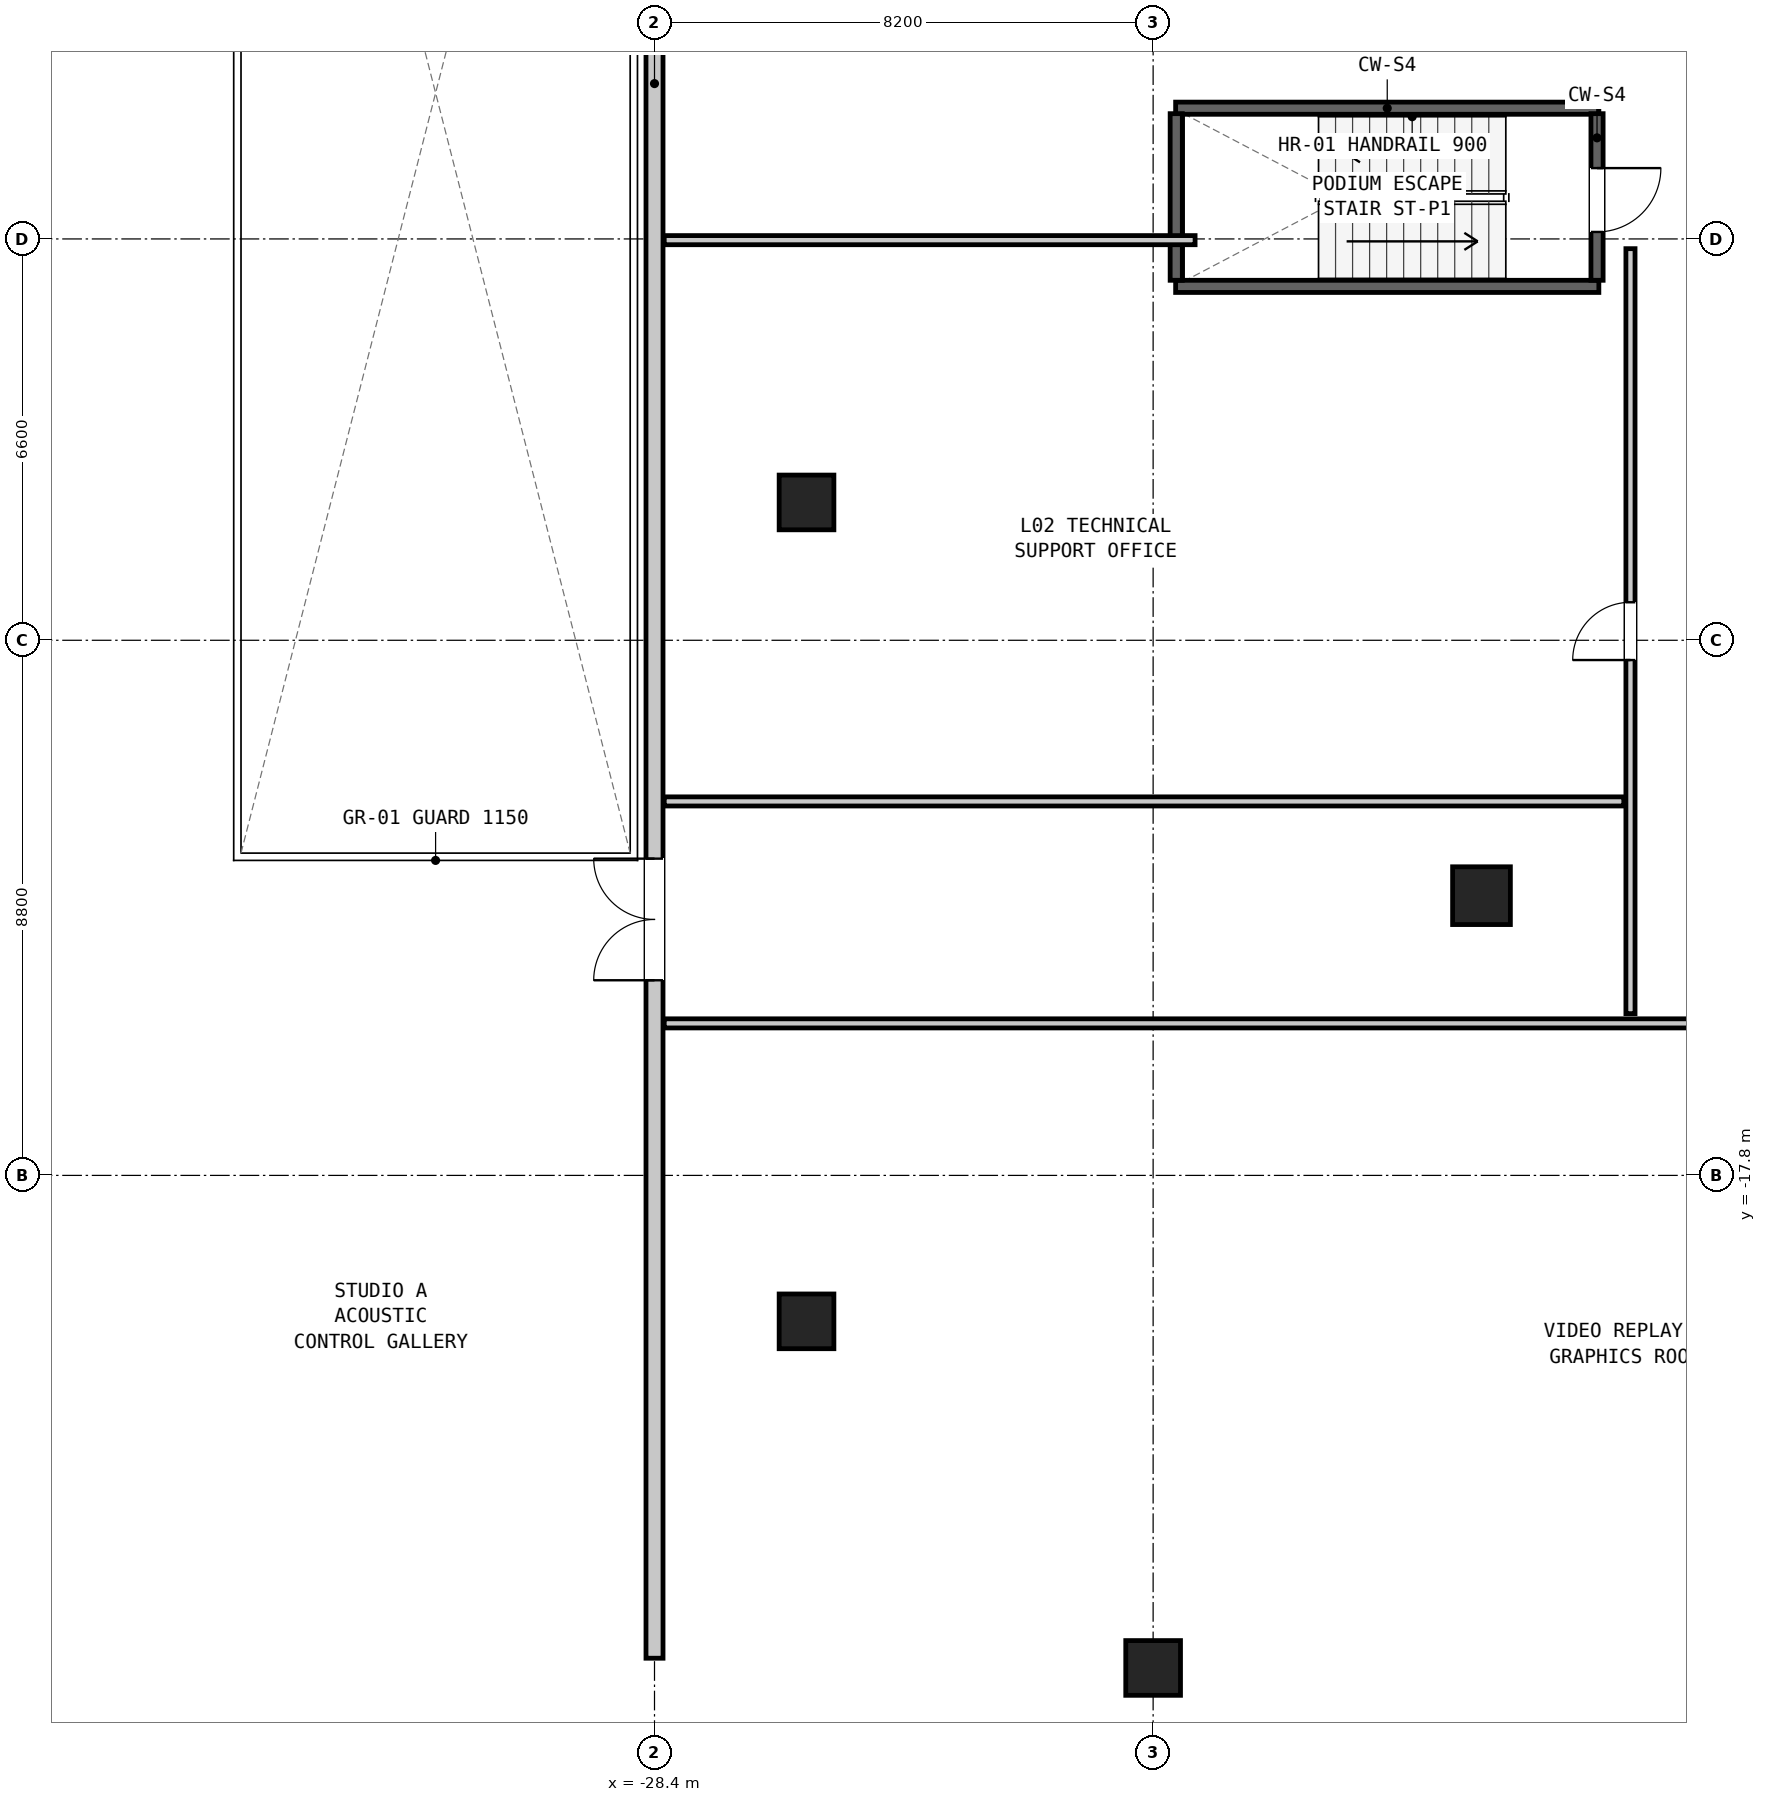
"""IFC4 building model, lengths in metres.
Left out: names, types, materials, properties, quantities, classifications, styles, units other than length and angle.
Written with IfcOpenShell. Run it as: python <this file> out.ifc"""

import sys

from ifc_helpers import new_model, si_unit, direction, frame, frame_2d, origin, origin_2d, place, context, subcontext, project, spatial, rectangle, hollow_rectangle, extrude, element, fill, save


model = new_model("IFC4")
c1 = context("Model", 3, precision=1e-05, world=origin(), true_north=direction((0.0, 1.0)))
c2 = subcontext(c1, "Body", "Model", "MODEL_VIEW")
j1 = project(units=[si_unit("LENGTHUNIT", "METRE"), si_unit("PLANEANGLEUNIT", "RADIAN")], contexts=[c1])
p1 = place(None, origin())
s1 = spatial("IfcSite", under=j1, at=p1, CompositionType="ELEMENT")
p2 = place(p1, origin())
s2 = spatial("IfcBuilding", under=s1, at=p2, CompositionType="ELEMENT")
p3 = place(p2, frame((0.0, 0.0, 9.3)))
s3 = spatial("IfcBuildingStorey", under=s2, at=p3, CompositionType="ELEMENT", Elevation=9.3)
p4 = place(p3, frame((-14.8, -13.2, 0.0), z_axis=(0.0, 0.0, 1.0), x_axis=(1.0, 0.0, 0.0)))
e1 = element("IfcColumn", 1, at=p4, inside=s3, PredefinedType="COLUMN", context=c2, shape_type="SweptSolid", body=[
    extrude(hollow_rectangle(XDim=0.95, YDim=0.95, WallThickness=0.06, at=origin_2d()), origin(), (0.0, 0.0, 1.0), 4.2),
])
for number, where, z_axis, x_axis in (
    (2, (-20.2, -25.9, 0.0), (0.0, 0.0, 1.0), (1.0, 0.0, 0.0)),
    (3, (-25.9, -6.733, 0.0), (0.0, 0.0, 1.0), (0.0, 1.0, 0.0)),
    (4, (-25.9, -20.2, 0.0), (0.0, 0.0, 1.0), (0.0, 1.0, 0.0)),
):
    element("IfcColumn", number, at=place(p3, frame(where, z_axis=z_axis, x_axis=x_axis)), inside=s3, PredefinedType="COLUMN", context=c2, shape_type="SweptSolid", body=[
        extrude(hollow_rectangle(XDim=0.9, YDim=0.9, WallThickness=0.055, at=origin_2d()), origin(), (0.0, 0.0, 1.0), 4.2),
    ])
for number, where, z_axis, x_axis in (
    (5, (-19.83, -0.25, 0.0), (0.0, 0.0, 1.0), (1.0, 0.0, 0.0)),
    (6, (-19.83, -3.18, 0.0), (0.0, 0.0, 1.0), (1.0, 0.0, 0.0)),
):
    element("IfcWall", number, at=place(p3, frame(where, z_axis=z_axis, x_axis=x_axis)), inside=s3, PredefinedType="SHEAR", context=c2, shape_type="SweptSolid", body=[
        extrude(rectangle(XDim=6.96, YDim=0.2, at=frame_2d((3.48, 0.0))), origin(), (0.0, 0.0, 1.0), 3.88),
    ])
p5 = place(p3, frame((-12.9, -0.34, 0.0), z_axis=(0.0, 0.0, 1.0), x_axis=(0.0, -1.0, 0.0)))
e7 = element("IfcWall", 7, at=p5, inside=s3, PredefinedType="SHEAR", context=c2, shape_type="SweptSolid", body=[
    extrude(rectangle(XDim=2.74, YDim=0.2, at=frame_2d((1.37, 0.0))), origin(), (0.0, 0.0, 1.0), 3.88),
])
p6 = place(p5, frame((0.895, 0.0, 0.0)))
e8 = element("IfcOpeningElement", 8, at=p6, cuts=e7, PredefinedType="OPENING", context=c2, shape_type="SweptSolid", body=[
    extrude(rectangle(XDim=1.05, YDim=2.08, at=frame_2d((0.525, 1.04))), frame((0.0, 0.112, 0.0), z_axis=(0.0, -1.0, 0.0), x_axis=(1.0, 0.0, 0.0)), (0.0, 0.0, 1.0), 0.224),
])
p7 = place(p3, frame((-19.82, -3.08, 0.0), z_axis=(0.0, 0.0, 1.0), x_axis=(0.0, 1.0, 0.0)))
e9 = element("IfcWall", 9, at=p7, inside=s3, PredefinedType="SHEAR", context=c2, shape_type="SweptSolid", body=[
    extrude(rectangle(XDim=2.74, YDim=0.2, at=frame_2d((1.37, 0.0))), origin(), (0.0, 0.0, 1.0), 3.88),
])
p8 = place(p3, frame((-28.4, -25.74, 0.0), z_axis=(0.0, 0.0, 1.0), x_axis=(0.0, 1.0, 0.0)))
e10 = element("IfcWall", 10, at=p8, inside=s3, PredefinedType="MOVABLE", context=c2, shape_type="SweptSolid", body=[
    extrude(rectangle(XDim=51.48, YDim=0.28, at=frame_2d((25.74, 0.0))), origin(), (0.0, 0.0, 1.0), 3.88),
])
p9 = place(p8, frame((11.149, 0.0, 0.0)))
e11 = element("IfcOpeningElement", 11, at=p9, cuts=e10, PredefinedType="OPENING", context=c2, shape_type="SweptSolid", body=[
    extrude(rectangle(XDim=2.0, YDim=2.14, at=frame_2d((1.0, 1.07))), frame((0.0, 0.152, 0.0), z_axis=(0.0, -1.0, 0.0), x_axis=(1.0, 0.0, 0.0)), (0.0, 0.0, 1.0), 0.304),
])
p10 = place(p8, frame((38.64, 0.0, 0.0)))
e12 = element("IfcOpeningElement", 12, at=p10, cuts=e10, PredefinedType="OPENING", context=c2, shape_type="SweptSolid", body=[
    extrude(rectangle(XDim=2.0, YDim=2.14, at=frame_2d((1.0, 1.07))), frame((0.0, 0.152, 0.0), z_axis=(0.0, -1.0, 0.0), x_axis=(1.0, 0.0, 0.0)), (0.0, 0.0, 1.0), 0.304),
])
p11 = place(p3, frame((-28.24, -15.3, 0.0), z_axis=(0.0, 0.0, 1.0), x_axis=(1.0, 0.0, 0.0)))
e13 = element("IfcWall", 13, at=p11, inside=s3, PredefinedType="PARTITIONING", context=c2, shape_type="SweptSolid", body=[
    extrude(rectangle(XDim=31.58, YDim=0.15, at=frame_2d((15.79, 0.0))), origin(), (0.0, 0.0, 1.0), 3.88),
])
p12 = place(p11, frame((24.032, 0.0, 0.0)))
e14 = element("IfcOpeningElement", 14, at=p12, cuts=e13, PredefinedType="OPENING", context=c2, shape_type="SweptSolid", body=[
    extrude(rectangle(XDim=1.2, YDim=2.1, at=frame_2d((0.6, 1.05))), frame((0.0, 0.087, 0.0), z_axis=(0.0, -1.0, 0.0), x_axis=(1.0, 0.0, 0.0)), (0.0, 0.0, 1.0), 0.174),
])
p13 = place(p3, frame((-12.35, -15.14, 0.0), z_axis=(0.0, 0.0, 1.0), x_axis=(0.0, 1.0, 0.0)))
e15 = element("IfcWall", 15, at=p13, inside=s3, PredefinedType="PARTITIONING", context=c2, shape_type="SweptSolid", body=[
    extrude(rectangle(XDim=12.58, YDim=0.15, at=frame_2d((6.29, 0.0))), origin(), (0.0, 0.0, 1.0), 3.88),
])
p14 = place(p13, frame((5.815, 0.0, 0.0)))
e16 = element("IfcOpeningElement", 16, at=p14, cuts=e15, PredefinedType="OPENING", context=c2, shape_type="SweptSolid", body=[
    extrude(rectangle(XDim=0.95, YDim=2.1, at=frame_2d((0.475, 1.05))), frame((0.0, 0.087, 0.0), z_axis=(0.0, -1.0, 0.0), x_axis=(1.0, 0.0, 0.0)), (0.0, 0.0, 1.0), 0.174),
])
p15 = place(p3, frame((-28.24, -2.42, 0.0), z_axis=(0.0, 0.0, 1.0), x_axis=(1.0, 0.0, 0.0)))
e17 = element("IfcWall", 17, at=p15, inside=s3, PredefinedType="PARTITIONING", context=c2, shape_type="SweptSolid", body=[
    extrude(rectangle(XDim=8.73, YDim=0.15, at=frame_2d((4.365, 0.0))), origin(), (0.0, 0.0, 1.0), 2.742),
])
p16 = place(p3, frame((-28.24, -11.65, 0.0), z_axis=(0.0, 0.0, 1.0), x_axis=(1.0, 0.0, 0.0)))
e18 = element("IfcWall", 18, at=p16, inside=s3, PredefinedType="PARTITIONING", context=c2, shape_type="SweptSolid", body=[
    extrude(rectangle(XDim=15.78, YDim=0.15, at=frame_2d((7.89, 0.0))), origin(), (0.0, 0.0, 1.0), 3.88),
])
p17 = place(p6, origin())
e19 = element("IfcDoor", 19, at=p17, inside=s3, OperationType="SINGLE_SWING_LEFT", PredefinedType="DOOR", context=c2, shape_type="SweptSolid", body=[
    extrude(rectangle(XDim=1.05, YDim=2.08, at=frame_2d((0.525, 1.04))), frame((0.0, 0.025, 0.0), z_axis=(0.0, -1.0, 0.0), x_axis=(1.0, 0.0, 0.0)), (0.0, 0.0, 1.0), 0.05),
])
fill(e8, e19)
p18 = place(p9, origin())
e20 = element("IfcDoor", 20, at=p18, inside=s3, OperationType="DOUBLE_DOOR_SINGLE_SWING", PredefinedType="DOOR", context=c2, shape_type="SweptSolid", body=[
    extrude(rectangle(XDim=2.0, YDim=2.14, at=frame_2d((1.0, 1.07))), frame((0.0, 0.025, 0.0), z_axis=(0.0, -1.0, 0.0), x_axis=(1.0, 0.0, 0.0)), (0.0, 0.0, 1.0), 0.05),
])
fill(e11, e20)
p19 = place(p14, origin())
e21 = element("IfcDoor", 21, at=p19, inside=s3, OperationType="SINGLE_SWING_LEFT", PredefinedType="DOOR", context=c2, shape_type="SweptSolid", body=[
    extrude(rectangle(XDim=0.95, YDim=2.1, at=frame_2d((0.475, 1.05))), frame((0.0, 0.025, 0.0), z_axis=(0.0, -1.0, 0.0), x_axis=(1.0, 0.0, 0.0)), (0.0, 0.0, 1.0), 0.05),
])
fill(e16, e21)
save(model, sys.argv[1])
